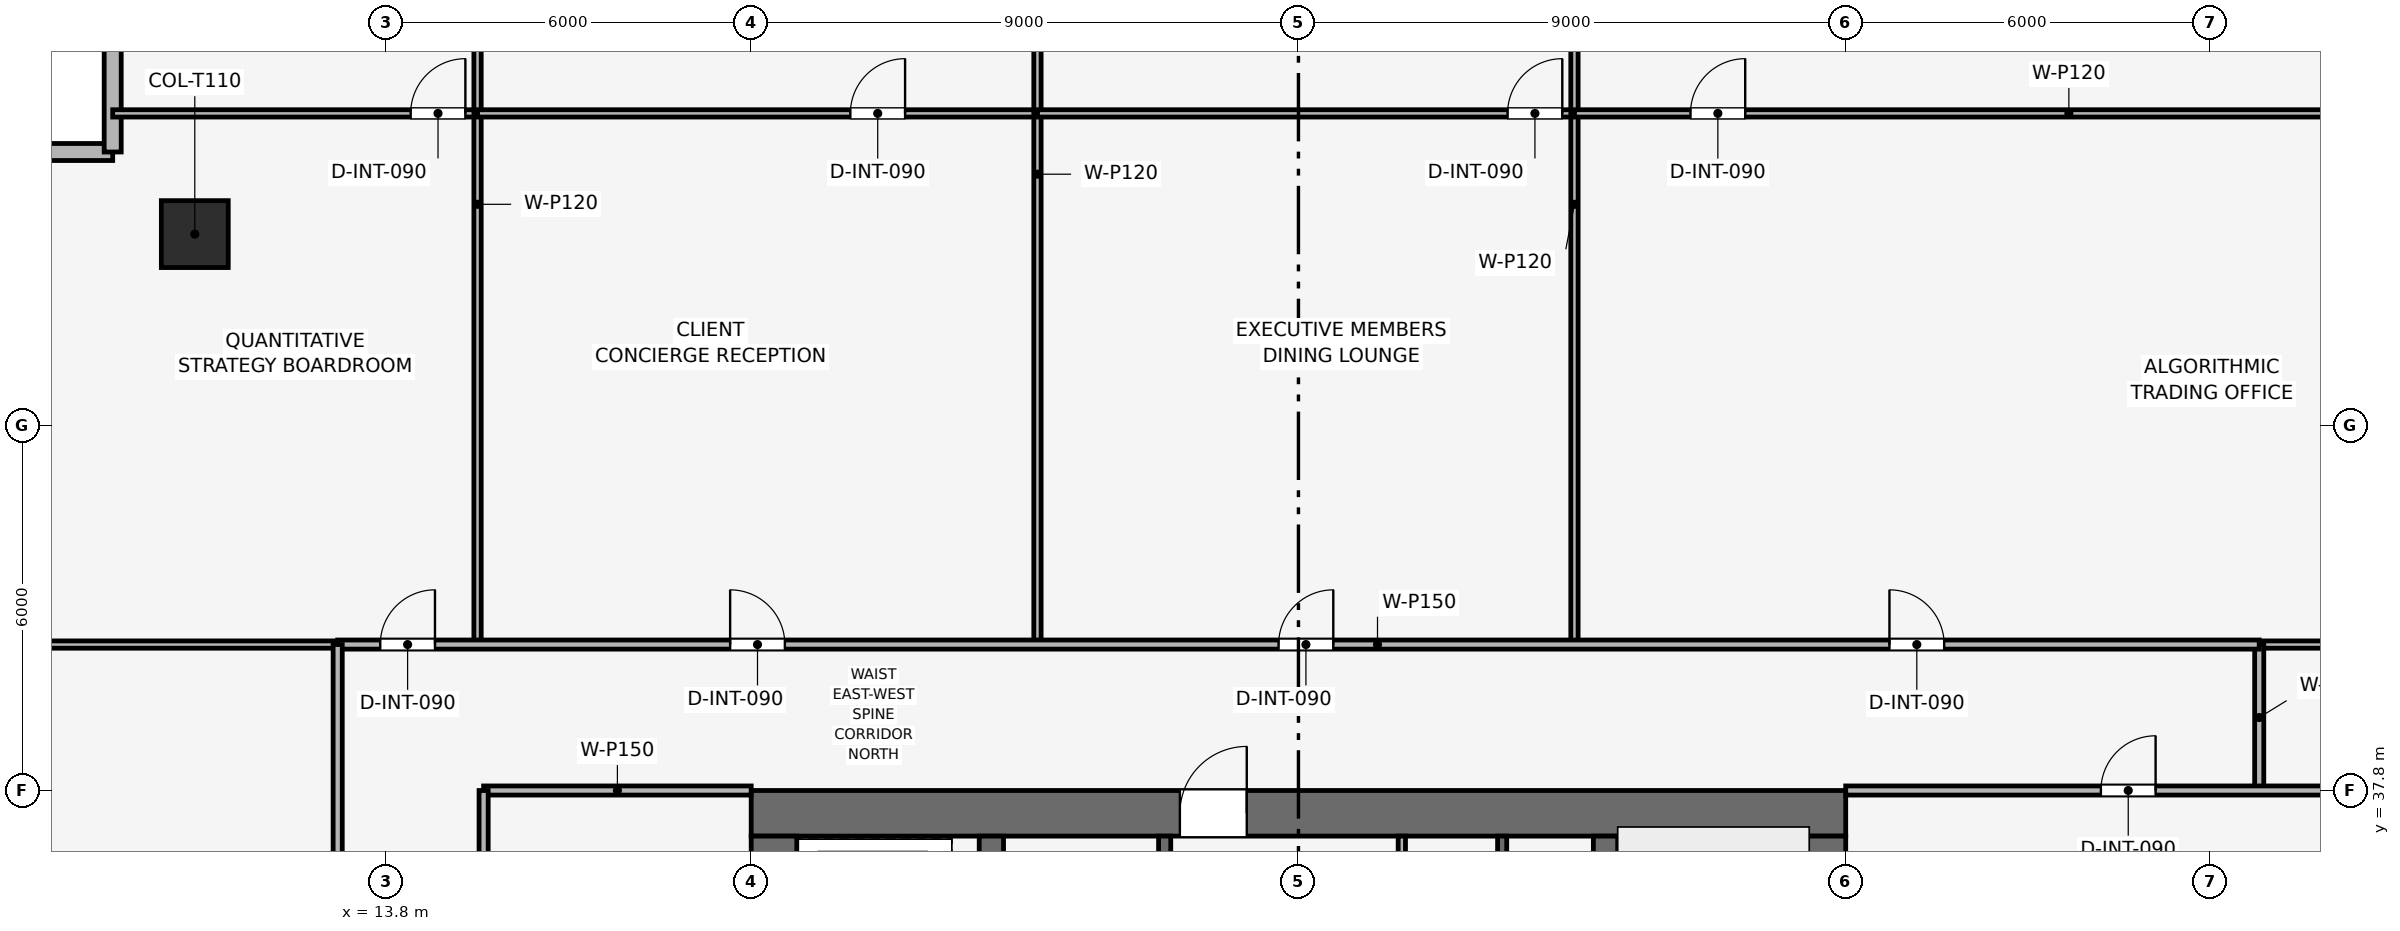
"""IFC4 building model, lengths in metres.
Left out: names, types, materials, properties, quantities, classifications, styles, units other than length and angle.
Written with IfcOpenShell. Run it as: python <this file> out.ifc"""

import sys

from ifc_helpers import new_model, si_unit, direction, frame, frame_2d, origin, origin_2d, place, context, subcontext, project, spatial, rectangle, extrude, element, fill, save


model = new_model("IFC4")
c1 = context("Model", 3, precision=1e-05, world=origin(), true_north=direction((0.0, 1.0)))
c2 = subcontext(c1, "Body", "Model", "MODEL_VIEW")
j1 = project(units=[si_unit("LENGTHUNIT", "METRE"), si_unit("PLANEANGLEUNIT", "RADIAN")], contexts=[c1])
p1 = place(None, origin())
s1 = spatial("IfcSite", under=j1, at=p1, CompositionType="ELEMENT")
p2 = place(p1, origin())
s2 = spatial("IfcBuilding", under=s1, at=p2, CompositionType="ELEMENT")
p3 = place(p2, frame((0.0, 0.0, 218.7)))
s3 = spatial("IfcBuildingStorey", under=s2, at=p3, CompositionType="ELEMENT", Elevation=218.7)
p4 = place(p3, frame((19.8, 37.425, 0.0), z_axis=(0.0, 0.0, 1.0), x_axis=(1.0, 0.0, 0.0)))
e1 = element("IfcWall", 1, at=p4, inside=s3, PredefinedType="SHEAR", context=c2, shape_type="SweptSolid", body=[
    extrude(rectangle(XDim=18.0, YDim=0.75, at=frame_2d((9.0, 0.0))), origin(), (0.0, 0.0, 1.0), 3.75),
])
p5 = place(p4, frame((7.05, 0.0, 0.0)))
e2 = element("IfcOpeningElement", 2, at=p5, cuts=e1, PredefinedType="OPENING", context=c2, shape_type="SweptSolid", body=[
    extrude(rectangle(XDim=1.1, YDim=2.15, at=frame_2d((0.55, 1.075))), frame((0.0, 0.385, 0.0), z_axis=(0.0, -1.0, 0.0), x_axis=(1.0, 0.0, 0.0)), (0.0, 0.0, 1.0), 0.77),
])
p6 = place(p3, frame((20.175, 20.55, 0.0), z_axis=(0.0, 0.0, 1.0), x_axis=(0.0, 1.0, 0.0)))
e3 = element("IfcWall", 3, at=p6, inside=s3, PredefinedType="SHEAR", context=c2, shape_type="SweptSolid", body=[
    extrude(rectangle(XDim=16.5, YDim=0.75, at=frame_2d((8.25, 0.0))), origin(), (0.0, 0.0, 1.0), 3.75),
])
p7 = place(p6, frame((10.25, 0.0, 0.0)))
e4 = element("IfcOpeningElement", 4, at=p7, cuts=e3, PredefinedType="OPENING", context=c2, shape_type="SweptSolid", body=[
    extrude(rectangle(XDim=1.1, YDim=2.15, at=frame_2d((0.55, 1.075))), frame((0.0, 0.385, 0.0), z_axis=(0.0, -1.0, 0.0), x_axis=(1.0, 0.0, 0.0)), (0.0, 0.0, 1.0), 0.77),
])
p8 = place(p3, frame((37.425, 20.55, 0.0), z_axis=(0.0, 0.0, 1.0), x_axis=(0.0, 1.0, 0.0)))
e5 = element("IfcWall", 5, at=p8, inside=s3, PredefinedType="SHEAR", context=c2, shape_type="SweptSolid", body=[
    extrude(rectangle(XDim=16.5, YDim=0.75, at=frame_2d((8.25, 0.0))), origin(), (0.0, 0.0, 1.0), 3.75),
])
p9 = place(p8, frame((4.75, 0.0, 0.0)))
e6 = element("IfcOpeningElement", 6, at=p9, cuts=e5, PredefinedType="OPENING", context=c2, shape_type="SweptSolid", body=[
    extrude(rectangle(XDim=1.1, YDim=2.15, at=frame_2d((0.55, 1.075))), frame((0.0, 0.385, 0.0), z_axis=(0.0, -1.0, 0.0), x_axis=(1.0, 0.0, 0.0)), (0.0, 0.0, 1.0), 0.77),
])
for number, where, z_axis, x_axis in (
    (7, (23.75, 20.55, 0.0), (0.0, 0.0, 1.0), (0.0, 1.0, 0.0)),
    (8, (33.85, 20.55, 0.0), (0.0, 0.0, 1.0), (0.0, 1.0, 0.0)),
):
    element("IfcWall", number, at=place(p3, frame(where, z_axis=z_axis, x_axis=x_axis)), inside=s3, PredefinedType="SHEAR", context=c2, shape_type="SweptSolid", body=[
        extrude(rectangle(XDim=16.5, YDim=0.4, at=frame_2d((8.25, 0.0))), origin(), (0.0, 0.0, 1.0), 3.75),
    ])
p10 = place(p3, frame((10.65, 46.95, 0.003), z_axis=(0.0, 0.0, 1.0), x_axis=(1.0, 0.0, 0.0)))
e9 = element("IfcColumn", 9, at=p10, inside=s3, PredefinedType="COLUMN", context=c2, shape_type="SweptSolid", body=[
    extrude(rectangle(XDim=1.1, YDim=1.1, at=origin_2d()), origin(), (0.0, 0.0, 1.0), 3.494),
])
p11 = place(p3, frame((1.93, 48.3, 0.0), z_axis=(0.0, 0.0, 1.0), x_axis=(1.0, 0.0, 0.0)))
e10 = element("IfcWall", 10, at=p11, inside=s3, PredefinedType="SOLIDWALL", context=c2, shape_type="SweptSolid", body=[
    extrude(rectangle(XDim=7.37, YDim=0.28, at=frame_2d((3.685, 0.0))), origin(), (0.0, 0.0, 1.0), 3.5),
])
p12 = place(p11, frame((2.435, 0.0, 0.9)))
e11 = element("IfcOpeningElement", 11, at=p12, cuts=e10, PredefinedType="OPENING", context=c2, shape_type="SweptSolid", body=[
    extrude(rectangle(XDim=2.5, YDim=1.9, at=frame_2d((1.25, 0.95))), frame((0.0, 0.15, 0.0), z_axis=(0.0, -1.0, 0.0), x_axis=(1.0, 0.0, 0.0)), (0.0, 0.0, 1.0), 0.3),
])
p13 = place(p3, frame((9.3, 48.3, 0.0), z_axis=(0.0, 0.0, 1.0), x_axis=(0.0, 1.0, 0.0)))
e12 = element("IfcWall", 12, at=p13, inside=s3, PredefinedType="SOLIDWALL", context=c2, shape_type="SweptSolid", body=[
    extrude(rectangle(XDim=7.37, YDim=0.28, at=frame_2d((3.685, 0.0))), origin(), (0.0, 0.0, 1.0), 3.5),
])
p14 = place(p13, frame((2.435, 0.0, 0.9)))
e13 = element("IfcOpeningElement", 13, at=p14, cuts=e12, PredefinedType="OPENING", context=c2, shape_type="SweptSolid", body=[
    extrude(rectangle(XDim=2.5, YDim=1.9, at=frame_2d((1.25, 0.95))), frame((0.0, 0.15, 0.0), z_axis=(0.0, -1.0, 0.0), x_axis=(1.0, 0.0, 0.0)), (0.0, 0.0, 1.0), 0.3),
])
p15 = place(p3, frame((32.15, 34.0, 0.0), z_axis=(0.0, 0.0, 1.0), x_axis=(0.0, 1.0, 0.0)))
e14 = element("IfcWall", 14, at=p15, inside=s3, PredefinedType="SHEAR", context=c2, shape_type="SweptSolid", body=[
    extrude(rectangle(XDim=3.05, YDim=0.15, at=frame_2d((1.525, 0.0))), origin(), (0.0, 0.0, 1.0), 3.5),
])
p16 = place(p3, frame((26.6, 34.0, 0.0), z_axis=(0.0, 0.0, 1.0), x_axis=(0.0, 1.0, 0.0)))
e15 = element("IfcWall", 15, at=p16, inside=s3, PredefinedType="SHEAR", context=c2, shape_type="SweptSolid", body=[
    extrude(rectangle(XDim=3.05, YDim=0.2, at=frame_2d((1.525, 0.0))), origin(), (0.0, 0.0, 1.0), 3.5),
])
p17 = place(p16, frame((0.75, 0.0, 0.0)))
e16 = element("IfcOpeningElement", 16, at=p17, cuts=e15, PredefinedType="OPENING", context=c2, shape_type="SweptSolid", body=[
    extrude(rectangle(XDim=1.1, YDim=2.15, at=frame_2d((0.55, 1.075))), frame((0.0, 0.11, 0.0), z_axis=(0.0, -1.0, 0.0), x_axis=(1.0, 0.0, 0.0)), (0.0, 0.0, 1.0), 0.22),
])
p18 = place(p3, frame((30.5, 33.925, 0.0), z_axis=(0.0, 0.0, 1.0), x_axis=(0.0, 1.0, 0.0)))
e17 = element("IfcWall", 17, at=p18, inside=s3, PredefinedType="PARTITIONING", context=c2, shape_type="SweptSolid", body=[
    extrude(rectangle(XDim=3.125, YDim=0.12, at=frame_2d((1.562, 0.0))), origin(), (0.0, 0.0, 1.0), 3.5),
])
p19 = place(p18, frame((0.85, 0.0, 0.0)))
e18 = element("IfcOpeningElement", 18, at=p19, cuts=e17, PredefinedType="OPENING", context=c2, shape_type="SweptSolid", body=[
    extrude(rectangle(XDim=0.9, YDim=2.1, at=frame_2d((0.45, 1.05))), frame((0.0, 0.07, 0.0), z_axis=(0.0, -1.0, 0.0), x_axis=(1.0, 0.0, 0.0)), (0.0, 0.0, 1.0), 0.14),
])
p20 = place(p3, frame((15.4, 37.8, 0.0), z_axis=(0.0, 0.0, 1.0), x_axis=(1.0, 0.0, 0.0)))
e19 = element("IfcWall", 19, at=p20, inside=s3, PredefinedType="PARTITIONING", context=c2, shape_type="SweptSolid", body=[
    extrude(rectangle(XDim=4.4, YDim=0.15, at=frame_2d((2.2, 0.0))), origin(), (0.0, 0.0, 1.0), 3.035),
])
p21 = place(p3, frame((15.4, 32.45, 0.0), z_axis=(0.0, 0.0, 1.0), x_axis=(0.0, 1.0, 0.0)))
e20 = element("IfcWall", 20, at=p21, inside=s3, PredefinedType="PARTITIONING", context=c2, shape_type="SweptSolid", body=[
    extrude(rectangle(XDim=5.35, YDim=0.15, at=frame_2d((2.675, 0.0))), origin(), (0.0, 0.0, 1.0), 3.035),
])
p22 = place(p21, frame((2.1, 0.0, 0.0)))
e21 = element("IfcOpeningElement", 21, at=p22, cuts=e20, PredefinedType="OPENING", context=c2, shape_type="SweptSolid", body=[
    extrude(rectangle(XDim=0.9, YDim=2.1, at=frame_2d((0.45, 1.05))), frame((0.0, 0.085, 0.0), z_axis=(0.0, -1.0, 0.0), x_axis=(1.0, 0.0, 0.0)), (0.0, 0.0, 1.0), 0.17),
])
p23 = place(p3, frame((9.3, 48.935, 0.0), z_axis=(0.0, 0.0, 1.0), x_axis=(1.0, 0.0, 0.0)))
e22 = element("IfcWall", 22, at=p23, inside=s3, PredefinedType="PARTITIONING", context=c2, shape_type="SweptSolid", body=[
    extrude(rectangle(XDim=6.0, YDim=0.12, at=frame_2d((3.0, 0.0))), origin(), (0.0, 0.0, 1.0), 2.885),
])
p24 = place(p23, frame((4.9, 0.0, 0.0)))
e23 = element("IfcOpeningElement", 23, at=p24, cuts=e22, PredefinedType="OPENING", context=c2, shape_type="SweptSolid", body=[
    extrude(rectangle(XDim=0.9, YDim=2.1, at=frame_2d((0.45, 1.05))), frame((0.0, 0.07, 0.0), z_axis=(0.0, -1.0, 0.0), x_axis=(1.0, 0.0, 0.0)), (0.0, 0.0, 1.0), 0.14),
])
p25 = place(p3, frame((15.3, 40.2, 0.0), z_axis=(0.0, 0.0, 1.0), x_axis=(0.0, 1.0, 0.0)))
e24 = element("IfcWall", 24, at=p25, inside=s3, PredefinedType="PARTITIONING", context=c2, shape_type="SweptSolid", body=[
    extrude(rectangle(XDim=15.47, YDim=0.12, at=frame_2d((7.735, 0.0))), origin(), (0.0, 0.0, 1.0), 2.885),
])
p26 = place(p3, frame((15.3, 48.935, 0.0), z_axis=(0.0, 0.0, 1.0), x_axis=(1.0, 0.0, 0.0)))
e25 = element("IfcWall", 25, at=p26, inside=s3, PredefinedType="PARTITIONING", context=c2, shape_type="SweptSolid", body=[
    extrude(rectangle(XDim=9.208, YDim=0.12, at=frame_2d((4.604, 0.0))), origin(), (0.0, 0.0, 1.0), 3.035),
])
p27 = place(p26, frame((6.131, 0.0, 0.0)))
e26 = element("IfcOpeningElement", 26, at=p27, cuts=e25, PredefinedType="OPENING", context=c2, shape_type="SweptSolid", body=[
    extrude(rectangle(XDim=0.9, YDim=2.1, at=frame_2d((0.45, 1.05))), frame((0.0, 0.07, 0.0), z_axis=(0.0, -1.0, 0.0), x_axis=(1.0, 0.0, 0.0)), (0.0, 0.0, 1.0), 0.14),
])
p28 = place(p3, frame((24.508, 40.2, 0.0), z_axis=(0.0, 0.0, 1.0), x_axis=(0.0, 1.0, 0.0)))
e27 = element("IfcWall", 27, at=p28, inside=s3, PredefinedType="PARTITIONING", context=c2, shape_type="SweptSolid", body=[
    extrude(rectangle(XDim=15.47, YDim=0.12, at=frame_2d((7.735, 0.0))), origin(), (0.0, 0.0, 1.0), 2.885),
])
p29 = place(p3, frame((24.508, 48.935, 0.0), z_axis=(0.0, 0.0, 1.0), x_axis=(1.0, 0.0, 0.0)))
e28 = element("IfcWall", 28, at=p29, inside=s3, PredefinedType="PARTITIONING", context=c2, shape_type="SweptSolid", body=[
    extrude(rectangle(XDim=8.831, YDim=0.12, at=frame_2d((4.416, 0.0))), origin(), (0.0, 0.0, 1.0), 3.035),
])
p30 = place(p29, frame((7.731, 0.0, 0.0)))
e29 = element("IfcOpeningElement", 29, at=p30, cuts=e28, PredefinedType="OPENING", context=c2, shape_type="SweptSolid", body=[
    extrude(rectangle(XDim=0.9, YDim=2.1, at=frame_2d((0.45, 1.05))), frame((0.0, 0.07, 0.0), z_axis=(0.0, -1.0, 0.0), x_axis=(1.0, 0.0, 0.0)), (0.0, 0.0, 1.0), 0.14),
])
p31 = place(p3, frame((33.339, 40.2, 0.0), z_axis=(0.0, 0.0, 1.0), x_axis=(0.0, 1.0, 0.0)))
e30 = element("IfcWall", 30, at=p31, inside=s3, PredefinedType="PARTITIONING", context=c2, shape_type="SweptSolid", body=[
    extrude(rectangle(XDim=15.47, YDim=0.12, at=frame_2d((7.735, 0.0))), origin(), (0.0, 0.0, 1.0), 2.885),
])
p32 = place(p3, frame((33.339, 48.935, 0.0), z_axis=(0.0, 0.0, 1.0), x_axis=(1.0, 0.0, 0.0)))
e31 = element("IfcWall", 31, at=p32, inside=s3, PredefinedType="PARTITIONING", context=c2, shape_type="SweptSolid", body=[
    extrude(rectangle(XDim=14.961, YDim=0.12, at=frame_2d((7.48, 0.0))), origin(), (0.0, 0.0, 1.0), 2.885),
])
p33 = place(p32, frame((1.908, 0.0, 0.0)))
e32 = element("IfcOpeningElement", 32, at=p33, cuts=e31, PredefinedType="OPENING", context=c2, shape_type="SweptSolid", body=[
    extrude(rectangle(XDim=0.9, YDim=2.1, at=frame_2d((0.45, 1.05))), frame((0.0, 0.07, 0.0), z_axis=(0.0, -1.0, 0.0), x_axis=(1.0, 0.0, 0.0)), (0.0, 0.0, 1.0), 0.14),
])
p34 = place(p3, frame((1.93, 40.2, 0.0), z_axis=(0.0, 0.0, 1.0), x_axis=(1.0, 0.0, 0.0)))
e33 = element("IfcWall", 33, at=p34, inside=s3, PredefinedType="PARTITIONING", context=c2, shape_type="SweptSolid", body=[
    extrude(rectangle(XDim=11.07, YDim=0.12, at=frame_2d((5.535, 0.0))), origin(), (0.0, 0.0, 1.0), 2.885),
])
p35 = place(p3, frame((44.6, 40.2, 0.0), z_axis=(0.0, 0.0, 1.0), x_axis=(1.0, 0.0, 0.0)))
e34 = element("IfcWall", 34, at=p35, inside=s3, PredefinedType="PARTITIONING", context=c2, shape_type="SweptSolid", body=[
    extrude(rectangle(XDim=11.07, YDim=0.12, at=frame_2d((5.535, 0.0))), origin(), (0.0, 0.0, 1.0), 2.885),
])
p36 = place(p3, frame((44.6, 37.8, 0.0), z_axis=(0.0, 0.0, 1.0), x_axis=(0.0, 1.0, 0.0)))
e35 = element("IfcWall", 35, at=p36, inside=s3, PredefinedType="PARTITIONING", context=c2, shape_type="SweptSolid", body=[
    extrude(rectangle(XDim=2.4, YDim=0.15, at=frame_2d((1.2, 0.0))), origin(), (0.0, 0.0, 1.0), 3.5),
])
p37 = place(p3, frame((37.8, 37.8, 0.0), z_axis=(0.0, 0.0, 1.0), x_axis=(1.0, 0.0, 0.0)))
e36 = element("IfcWall", 36, at=p37, inside=s3, PredefinedType="PARTITIONING", context=c2, shape_type="SweptSolid", body=[
    extrude(rectangle(XDim=17.87, YDim=0.15, at=frame_2d((8.935, 0.0))), origin(), (0.0, 0.0, 1.0), 2.885),
])
p38 = place(p37, frame((4.196, 0.0, 0.0)))
e37 = element("IfcOpeningElement", 37, at=p38, cuts=e36, PredefinedType="OPENING", context=c2, shape_type="SweptSolid", body=[
    extrude(rectangle(XDim=0.9, YDim=2.1, at=frame_2d((0.45, 1.05))), frame((0.0, 0.085, 0.0), z_axis=(0.0, -1.0, 0.0), x_axis=(1.0, 0.0, 0.0)), (0.0, 0.0, 1.0), 0.17),
])
p39 = place(p3, frame((13.0, 40.2, 0.0), z_axis=(0.0, 0.0, 1.0), x_axis=(1.0, 0.0, 0.0)))
e38 = element("IfcWall", 38, at=p39, inside=s3, PredefinedType="PARTITIONING", context=c2, shape_type="SweptSolid", body=[
    extrude(rectangle(XDim=31.6, YDim=0.15, at=frame_2d((15.8, 0.0))), origin(), (0.0, 0.0, 1.0), 3.035),
])
p40 = place(p39, frame((0.7, 0.0, 0.0)))
e39 = element("IfcOpeningElement", 39, at=p40, cuts=e38, PredefinedType="OPENING", context=c2, shape_type="SweptSolid", body=[
    extrude(rectangle(XDim=0.9, YDim=2.1, at=frame_2d((0.45, 1.05))), frame((0.0, 0.085, 0.0), z_axis=(0.0, -1.0, 0.0), x_axis=(1.0, 0.0, 0.0)), (0.0, 0.0, 1.0), 0.17),
])
p41 = place(p39, frame((6.454, 0.0, 0.0)))
e40 = element("IfcOpeningElement", 40, at=p41, cuts=e38, PredefinedType="OPENING", context=c2, shape_type="SweptSolid", body=[
    extrude(rectangle(XDim=0.9, YDim=2.1, at=frame_2d((0.45, 1.05))), frame((0.0, 0.085, 0.0), z_axis=(0.0, -1.0, 0.0), x_axis=(1.0, 0.0, 0.0)), (0.0, 0.0, 1.0), 0.17),
])
p42 = place(p39, frame((15.473, 0.0, 0.0)))
e41 = element("IfcOpeningElement", 41, at=p42, cuts=e38, PredefinedType="OPENING", context=c2, shape_type="SweptSolid", body=[
    extrude(rectangle(XDim=0.9, YDim=2.1, at=frame_2d((0.45, 1.05))), frame((0.0, 0.085, 0.0), z_axis=(0.0, -1.0, 0.0), x_axis=(1.0, 0.0, 0.0)), (0.0, 0.0, 1.0), 0.17),
])
p43 = place(p39, frame((25.519, 0.0, 0.0)))
e42 = element("IfcOpeningElement", 42, at=p43, cuts=e38, PredefinedType="OPENING", context=c2, shape_type="SweptSolid", body=[
    extrude(rectangle(XDim=0.9, YDim=2.1, at=frame_2d((0.45, 1.05))), frame((0.0, 0.085, 0.0), z_axis=(0.0, -1.0, 0.0), x_axis=(1.0, 0.0, 0.0)), (0.0, 0.0, 1.0), 0.17),
])
p44 = place(p3, frame((13.0, 17.4, 0.0), z_axis=(0.0, 0.0, 1.0), x_axis=(0.0, 1.0, 0.0)))
e43 = element("IfcWall", 43, at=p44, inside=s3, PredefinedType="PARTITIONING", context=c2, shape_type="SweptSolid", body=[
    extrude(rectangle(XDim=22.8, YDim=0.15, at=frame_2d((11.4, 0.0))), origin(), (0.0, 0.0, 1.0), 3.035),
])
p45 = place(p44, frame((4.641, 0.0, 0.0)))
e44 = element("IfcOpeningElement", 44, at=p45, cuts=e43, PredefinedType="OPENING", context=c2, shape_type="SweptSolid", body=[
    extrude(rectangle(XDim=0.9, YDim=2.1, at=frame_2d((0.45, 1.05))), frame((0.0, 0.085, 0.0), z_axis=(0.0, -1.0, 0.0), x_axis=(1.0, 0.0, 0.0)), (0.0, 0.0, 1.0), 0.17),
])
p46 = place(p44, frame((13.641, 0.0, 0.0)))
e45 = element("IfcOpeningElement", 45, at=p46, cuts=e43, PredefinedType="OPENING", context=c2, shape_type="SweptSolid", body=[
    extrude(rectangle(XDim=0.9, YDim=2.1, at=frame_2d((0.45, 1.05))), frame((0.0, 0.085, 0.0), z_axis=(0.0, -1.0, 0.0), x_axis=(1.0, 0.0, 0.0)), (0.0, 0.0, 1.0), 0.17),
])
p47 = place(p24, origin())
e46 = element("IfcDoor", 46, at=p47, inside=s3, OperationType="SINGLE_SWING_RIGHT", PredefinedType="DOOR", context=c2, shape_type="SweptSolid", body=[
    extrude(rectangle(XDim=0.9, YDim=2.1, at=frame_2d((0.45, 1.05))), frame((0.0, 0.025, 0.0), z_axis=(0.0, -1.0, 0.0), x_axis=(1.0, 0.0, 0.0)), (0.0, 0.0, 1.0), 0.05),
])
fill(e23, e46)
p48 = place(p27, origin())
e47 = element("IfcDoor", 47, at=p48, inside=s3, OperationType="SINGLE_SWING_RIGHT", PredefinedType="DOOR", context=c2, shape_type="SweptSolid", body=[
    extrude(rectangle(XDim=0.9, YDim=2.1, at=frame_2d((0.45, 1.05))), frame((0.0, 0.025, 0.0), z_axis=(0.0, -1.0, 0.0), x_axis=(1.0, 0.0, 0.0)), (0.0, 0.0, 1.0), 0.05),
])
fill(e26, e47)
p49 = place(p30, origin())
e48 = element("IfcDoor", 48, at=p49, inside=s3, OperationType="SINGLE_SWING_RIGHT", PredefinedType="DOOR", context=c2, shape_type="SweptSolid", body=[
    extrude(rectangle(XDim=0.9, YDim=2.1, at=frame_2d((0.45, 1.05))), frame((0.0, 0.025, 0.0), z_axis=(0.0, -1.0, 0.0), x_axis=(1.0, 0.0, 0.0)), (0.0, 0.0, 1.0), 0.05),
])
fill(e29, e48)
p50 = place(p33, origin())
e49 = element("IfcDoor", 49, at=p50, inside=s3, OperationType="SINGLE_SWING_RIGHT", PredefinedType="DOOR", context=c2, shape_type="SweptSolid", body=[
    extrude(rectangle(XDim=0.9, YDim=2.1, at=frame_2d((0.45, 1.05))), frame((0.0, 0.025, 0.0), z_axis=(0.0, -1.0, 0.0), x_axis=(1.0, 0.0, 0.0)), (0.0, 0.0, 1.0), 0.05),
])
fill(e32, e49)
p51 = place(p38, origin())
e50 = element("IfcDoor", 50, at=p51, inside=s3, OperationType="SINGLE_SWING_RIGHT", PredefinedType="DOOR", context=c2, shape_type="SweptSolid", body=[
    extrude(rectangle(XDim=0.9, YDim=2.1, at=frame_2d((0.45, 1.05))), frame((0.0, 0.025, 0.0), z_axis=(0.0, -1.0, 0.0), x_axis=(1.0, 0.0, 0.0)), (0.0, 0.0, 1.0), 0.05),
])
fill(e37, e50)
p52 = place(p40, origin())
e51 = element("IfcDoor", 51, at=p52, inside=s3, OperationType="SINGLE_SWING_RIGHT", PredefinedType="DOOR", context=c2, shape_type="SweptSolid", body=[
    extrude(rectangle(XDim=0.9, YDim=2.1, at=frame_2d((0.45, 1.05))), frame((0.0, 0.025, 0.0), z_axis=(0.0, -1.0, 0.0), x_axis=(1.0, 0.0, 0.0)), (0.0, 0.0, 1.0), 0.05),
])
fill(e39, e51)
p53 = place(p41, origin())
e52 = element("IfcDoor", 52, at=p53, inside=s3, OperationType="SINGLE_SWING_LEFT", PredefinedType="DOOR", context=c2, shape_type="SweptSolid", body=[
    extrude(rectangle(XDim=0.9, YDim=2.1, at=frame_2d((0.45, 1.05))), frame((0.0, 0.025, 0.0), z_axis=(0.0, -1.0, 0.0), x_axis=(1.0, 0.0, 0.0)), (0.0, 0.0, 1.0), 0.05),
])
fill(e40, e52)
p54 = place(p42, origin())
e53 = element("IfcDoor", 53, at=p54, inside=s3, OperationType="SINGLE_SWING_RIGHT", PredefinedType="DOOR", context=c2, shape_type="SweptSolid", body=[
    extrude(rectangle(XDim=0.9, YDim=2.1, at=frame_2d((0.45, 1.05))), frame((0.0, 0.025, 0.0), z_axis=(0.0, -1.0, 0.0), x_axis=(1.0, 0.0, 0.0)), (0.0, 0.0, 1.0), 0.05),
])
fill(e41, e53)
p55 = place(p43, origin())
e54 = element("IfcDoor", 54, at=p55, inside=s3, OperationType="SINGLE_SWING_LEFT", PredefinedType="DOOR", context=c2, shape_type="SweptSolid", body=[
    extrude(rectangle(XDim=0.9, YDim=2.1, at=frame_2d((0.45, 1.05))), frame((0.0, 0.025, 0.0), z_axis=(0.0, -1.0, 0.0), x_axis=(1.0, 0.0, 0.0)), (0.0, 0.0, 1.0), 0.05),
])
fill(e42, e54)
p56 = place(p5, origin())
e55 = element("IfcDoor", 55, at=p56, inside=s3, OperationType="SINGLE_SWING_RIGHT", PredefinedType="DOOR", context=c2, shape_type="SweptSolid", body=[
    extrude(rectangle(XDim=1.1, YDim=2.15, at=frame_2d((0.55, 1.075))), frame((0.0, 0.025, 0.0), z_axis=(0.0, -1.0, 0.0), x_axis=(1.0, 0.0, 0.0)), (0.0, 0.0, 1.0), 0.05),
])
fill(e2, e55)
save(model, sys.argv[1])
